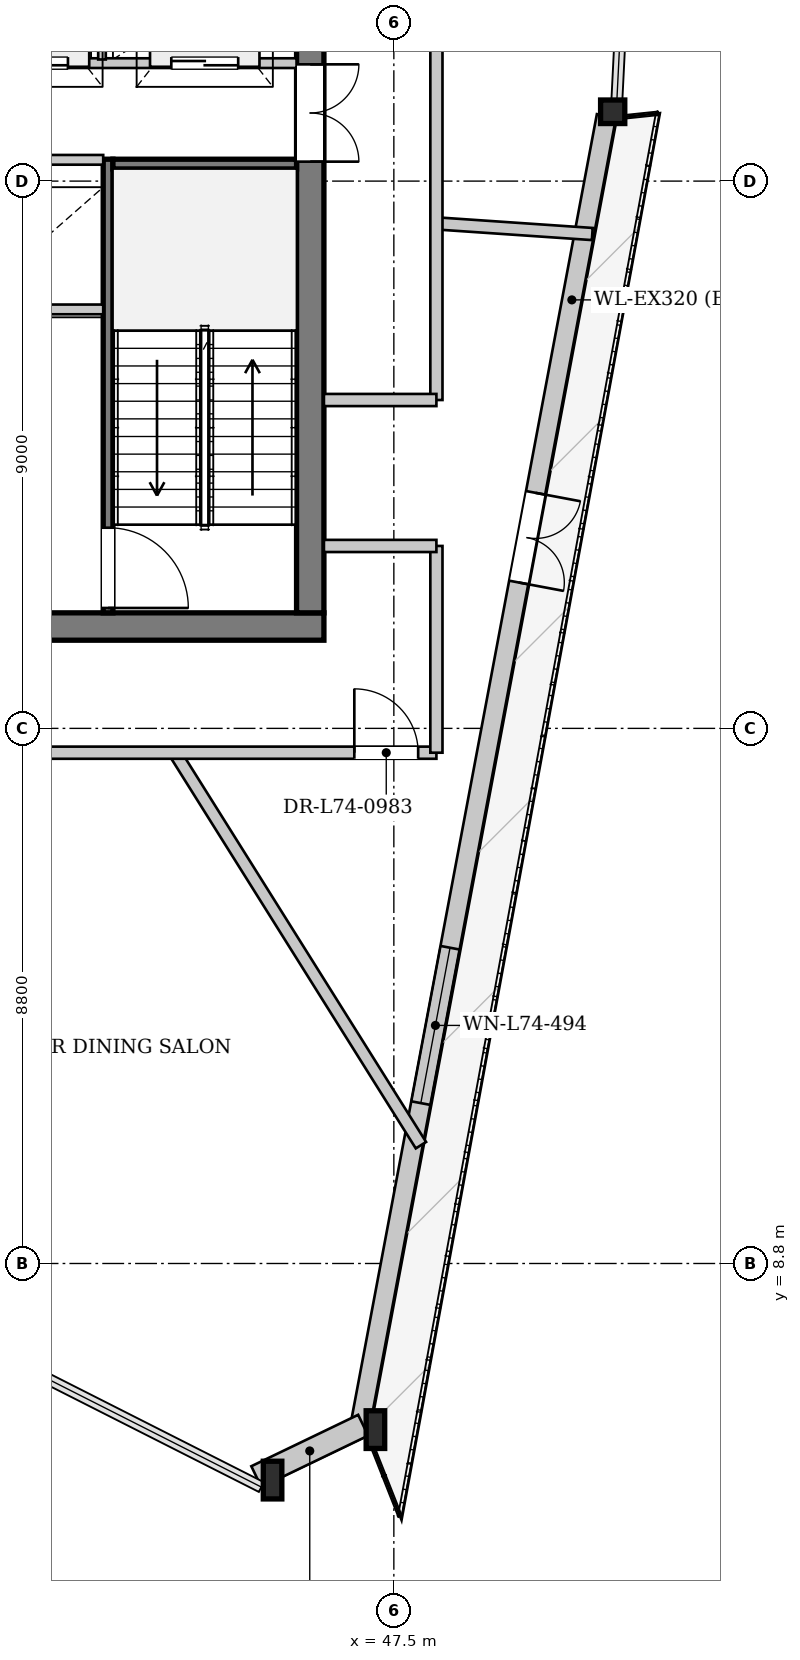
"""IFC4 building model, lengths in metres.
Left out: names, types, materials, properties, quantities, classifications, styles, units other than length and angle.
Written with IfcOpenShell. Run it as: python <this file> out.ifc"""

import sys

from ifc_helpers import new_model, si_unit, direction, frame, frame_2d, origin, origin_2d, place, context, subcontext, project, spatial, rectangle, i_section, extrude, source, transform, mapped, element, fill, save


model = new_model("IFC4")
c1 = context("Model", 3, precision=1e-05, world=origin(), true_north=direction((0.0, 1.0)))
c2 = subcontext(c1, "Body", "Model", "MODEL_VIEW")
j1 = project(units=[si_unit("LENGTHUNIT", "METRE"), si_unit("PLANEANGLEUNIT", "RADIAN")], contexts=[c1])
p1 = place(None, origin())
s1 = spatial("IfcSite", under=j1, at=p1, CompositionType="ELEMENT")
p2 = place(p1, origin())
s2 = spatial("IfcBuilding", under=s1, at=p2, CompositionType="ELEMENT")
p3 = place(p2, frame((0.0, 0.0, 277.7)))
s3 = spatial("IfcBuildingStorey", under=s2, at=p3, CompositionType="ELEMENT", Elevation=277.7)
m1 = source(origin(), c2, "Body", "SweptSolid", [
    extrude(i_section(OverallWidth=0.305, OverallDepth=0.62, WebThickness=0.021, FlangeThickness=0.04, at=origin_2d()), origin(), (0.0, 0.0, 1.0), 3.959),
])
p4 = place(p3, frame((45.321, 5.123, 0.0), z_axis=(0.093241063797, 0.057967328022, 0.993954673466), x_axis=(-0.527977918336, 0.84925809843, 0.0)))
e1 = element("IfcColumn", 1, at=p4, inside=s3, PredefinedType="COLUMN", context=c2, shape_type="MappedRepresentation", body=[
    mapped(m1, transform((0.0, 0.0, 0.0), x_axis=(1.0, 0.0, 0.0), y_axis=(0.0, 1.0, 0.0), z_axis=(0.0, 0.0, 1.0), scale=1.0)),
])
m2 = source(origin(), c2, "Body", "SweptSolid", [
    extrude(i_section(OverallWidth=0.305, OverallDepth=0.62, WebThickness=0.021, FlangeThickness=0.04, at=origin_2d()), origin(), (0.0, 0.0, 1.0), 3.947),
])
p5 = place(p3, frame((47.078, 5.969, 0.0), z_axis=(0.060366430178, 0.050222890681, 0.996912009838), x_axis=(-0.639564408319, 0.768737515418, 0.0)))
e2 = element("IfcColumn", 2, at=p5, inside=s3, PredefinedType="COLUMN", context=c2, shape_type="MappedRepresentation", body=[
    mapped(m2, transform((0.0, 0.0, 0.0), x_axis=(1.0, 0.0, 0.0), y_axis=(0.0, 1.0, 0.0), z_axis=(0.0, 0.0, 1.0), scale=1.0)),
])
m3 = source(origin(), c2, "Body", "SweptSolid", [
    extrude(i_section(OverallWidth=0.398, OverallDepth=0.387, WebThickness=0.019, FlangeThickness=0.029, at=origin_2d()), origin(), (0.0, 0.0, 1.0), 3.941),
])
p6 = place(p3, frame((51.154, 27.642, 0.0), z_axis=(-0.027750061815, 0.049615623914, 0.998382804305), x_axis=(-0.872766014986, -0.488138794899, 0.0)))
e3 = element("IfcColumn", 3, at=p6, inside=s3, PredefinedType="COLUMN", context=c2, shape_type="MappedRepresentation", body=[
    mapped(m3, transform((0.0, 0.0, 0.0), x_axis=(1.0, 0.0, 0.0), y_axis=(0.0, 1.0, 0.0), z_axis=(0.0, 0.0, 1.0), scale=1.0)),
])
p7 = place(p3, frame((50.997, 27.672, 0.0), z_axis=(0.0, 0.0, 1.0), x_axis=(-0.184819886047, -0.982772409931, 0.0)))
e4 = element("IfcWall", 4, at=p7, inside=s3, PredefinedType="SOLIDWALL", context=c2, shape_type="SweptSolid", body=[
    extrude(rectangle(XDim=22.053, YDim=0.32, at=frame_2d((11.027, 0.0))), origin(), (0.0, 0.0, 1.0), 3.462),
])
p8 = place(p7, frame((6.307, 0.0, 0.0)))
e5 = element("IfcOpeningElement", 5, at=p8, cuts=e4, PredefinedType="OPENING", context=c2, shape_type="SweptSolid", body=[
    extrude(rectangle(XDim=1.5, YDim=2.3, at=frame_2d((0.75, 1.15))), frame((0.0, 0.17, 0.0), z_axis=(0.0, -1.0, 0.0), x_axis=(1.0, 0.0, 0.0)), (0.0, 0.0, 1.0), 0.34),
])
p9 = place(p7, frame((13.919, 0.0, 0.65)))
e6 = element("IfcOpeningElement", 6, at=p9, cuts=e4, PredefinedType="OPENING", context=c2, shape_type="SweptSolid", body=[
    extrude(rectangle(XDim=2.6, YDim=2.35, at=frame_2d((1.3, 1.175))), frame((0.0, 0.17, 0.0), z_axis=(0.0, -1.0, 0.0), x_axis=(1.0, 0.0, 0.0)), (0.0, 0.0, 1.0), 0.34),
])
p10 = place(p3, frame((46.996, 6.14, 0.0), z_axis=(0.0, 0.0, 1.0), x_axis=(-0.901133930153, -0.43354081691, 0.0)))
e7 = element("IfcWall", 7, at=p10, inside=s3, PredefinedType="SOLIDWALL", context=c2, shape_type="SweptSolid", body=[
    extrude(rectangle(XDim=1.95, YDim=0.38, at=frame_2d((0.975, 0.0))), origin(), (0.0, 0.0, 1.0), 3.462),
])
p11 = place(p3, frame((46.35, 19.275, 0.0), z_axis=(0.0, 0.0, 1.0), x_axis=(-1.0, 0.0, 0.0)))
e8 = element("IfcWall", 8, at=p11, inside=s3, PredefinedType="SHEAR", context=c2, shape_type="SweptSolid", body=[
    extrude(rectangle(XDim=16.7, YDim=0.45, at=frame_2d((8.35, 0.0))), origin(), (0.0, 0.0, 1.0), 3.92),
])
p12 = place(p11, frame((4.55, 0.0, 0.0)))
e9 = element("IfcOpeningElement", 9, at=p12, cuts=e8, PredefinedType="OPENING", context=c2, shape_type="SweptSolid", body=[
    extrude(rectangle(XDim=1.12, YDim=2.25, at=frame_2d((0.56, 1.125))), frame((0.0, 0.235, 0.0), z_axis=(0.0, -1.0, 0.0), x_axis=(1.0, 0.0, 0.0)), (0.0, 0.0, 1.0), 0.47),
])
p13 = place(p11, frame((11.05, 0.0, 0.0)))
e10 = element("IfcOpeningElement", 10, at=p13, cuts=e8, PredefinedType="OPENING", context=c2, shape_type="SweptSolid", body=[
    extrude(rectangle(XDim=1.12, YDim=2.25, at=frame_2d((0.56, 1.125))), frame((0.0, 0.235, 0.0), z_axis=(0.0, -1.0, 0.0), x_axis=(1.0, 0.0, 0.0)), (0.0, 0.0, 1.0), 0.47),
])
p14 = place(p3, frame((46.125, 33.7, 0.0), z_axis=(0.0, 0.0, 1.0), x_axis=(0.0, -1.0, 0.0)))
e11 = element("IfcWall", 11, at=p14, inside=s3, PredefinedType="SHEAR", context=c2, shape_type="SweptSolid", body=[
    extrude(rectangle(XDim=14.2, YDim=0.45, at=frame_2d((7.1, 0.0))), origin(), (0.0, 0.0, 1.0), 3.92),
])
p15 = place(p14, frame((5.18, 0.0, 0.0)))
e12 = element("IfcOpeningElement", 12, at=p15, cuts=e11, PredefinedType="OPENING", context=c2, shape_type="SweptSolid", body=[
    extrude(rectangle(XDim=1.6, YDim=2.2, at=frame_2d((0.8, 1.1))), frame((0.0, 0.235, 0.0), z_axis=(0.0, -1.0, 0.0), x_axis=(1.0, 0.0, 0.0)), (0.0, 0.0, 1.0), 0.47),
])
p16 = place(p14, frame((2.05, 0.0, 0.0)))
e13 = element("IfcOpeningElement", 13, at=p16, cuts=e11, PredefinedType="OPENING", context=c2, shape_type="SweptSolid", body=[
    extrude(rectangle(XDim=0.95, YDim=2.1, at=frame_2d((0.475, 1.05))), frame((0.0, 0.235, 0.0), z_axis=(0.0, -1.0, 0.0), x_axis=(1.0, 0.0, 0.0)), (0.0, 0.0, 1.0), 0.47),
])
p17 = place(p3, frame((42.8, 26.96, 0.0), z_axis=(0.0, 0.0, 1.0), x_axis=(0.0, -1.0, 0.0)))
e14 = element("IfcWall", 14, at=p17, inside=s3, PredefinedType="PARTITIONING", context=c2, shape_type="SweptSolid", body=[
    extrude(rectangle(XDim=7.46, YDim=0.16, at=frame_2d((3.73, 0.0))), origin(), (0.0, 0.0, 1.0), 3.92),
])
p18 = place(p17, frame((6.06, 0.0, 0.0)))
e15 = element("IfcOpeningElement", 15, at=p18, cuts=e14, PredefinedType="OPENING", context=c2, shape_type="SweptSolid", body=[
    extrude(rectangle(XDim=1.32, YDim=2.2, at=frame_2d((0.66, 1.1))), frame((0.0, 0.09, 0.0), z_axis=(0.0, -1.0, 0.0), x_axis=(1.0, 0.0, 0.0)), (0.0, 0.0, 1.0), 0.18),
])
p19 = place(p3, frame((42.88, 26.88, 0.0), z_axis=(0.0, 0.0, 1.0), x_axis=(1.0, 0.0, 0.0)))
e16 = element("IfcWall", 16, at=p19, inside=s3, PredefinedType="PARTITIONING", context=c2, shape_type="SweptSolid", body=[
    extrude(rectangle(XDim=3.02, YDim=0.16, at=frame_2d((1.51, 0.0))), origin(), (0.0, 0.0, 1.0), 3.92),
])
p20 = place(p3, frame((33.28, 24.49, 0.0), z_axis=(0.0, 0.0, 1.0), x_axis=(1.0, 0.0, 0.0)))
e17 = element("IfcWall", 17, at=p20, inside=s3, PredefinedType="PARTITIONING", context=c2, shape_type="SweptSolid", body=[
    extrude(rectangle(XDim=9.44, YDim=0.16, at=frame_2d((4.72, 0.0))), origin(), (0.0, 0.0, 1.0), 3.92),
])
p21 = place(p20, frame((0.85, 0.0, 0.95)))
e18 = element("IfcOpeningElement", 18, at=p21, cuts=e17, PredefinedType="OPENING", context=c2, shape_type="SweptSolid", body=[
    extrude(rectangle(XDim=1.4, YDim=1.8, at=frame_2d((0.7, 0.9))), frame((0.0, 0.09, 0.0), z_axis=(0.0, -1.0, 0.0), x_axis=(1.0, 0.0, 0.0)), (0.0, 0.0, 1.0), 0.18),
])
p22 = place(p3, frame((33.28, 26.95, 0.0), z_axis=(0.0, 0.0, 1.0), x_axis=(1.0, 0.0, 0.0)))
e19 = element("IfcWall", 19, at=p22, inside=s3, PredefinedType="PARTITIONING", context=c2, shape_type="SweptSolid", body=[
    extrude(rectangle(XDim=9.44, YDim=0.16, at=frame_2d((4.72, 0.0))), origin(), (0.0, 0.0, 1.0), 3.92),
])
p23 = place(p22, frame((1.2, 0.0, 0.0)))
e20 = element("IfcOpeningElement", 20, at=p23, cuts=e19, PredefinedType="OPENING", context=c2, shape_type="SweptSolid", body=[
    extrude(rectangle(XDim=0.95, YDim=2.1, at=frame_2d((0.475, 1.05))), frame((0.0, 0.09, 0.0), z_axis=(0.0, -1.0, 0.0), x_axis=(1.0, 0.0, 0.0)), (0.0, 0.0, 1.0), 0.18),
])
p24 = place(p22, frame((4.65, 0.0, 0.0)))
e21 = element("IfcOpeningElement", 21, at=p24, cuts=e19, PredefinedType="OPENING", context=c2, shape_type="SweptSolid", body=[
    extrude(rectangle(XDim=0.95, YDim=2.1, at=frame_2d((0.475, 1.05))), frame((0.0, 0.09, 0.0), z_axis=(0.0, -1.0, 0.0), x_axis=(1.0, 0.0, 0.0)), (0.0, 0.0, 1.0), 0.18),
])
p25 = place(p3, frame((33.28, 28.54, 0.0), z_axis=(0.0, 0.0, 1.0), x_axis=(1.0, 0.0, 0.0)))
e22 = element("IfcWall", 22, at=p25, inside=s3, PredefinedType="PARTITIONING", context=c2, shape_type="SweptSolid", body=[
    extrude(rectangle(XDim=12.62, YDim=0.16, at=frame_2d((6.31, 0.0))), origin(), (0.0, 0.0, 1.0), 3.92),
])
p26 = place(p25, frame((5.63, 0.0, 0.0)))
e23 = element("IfcOpeningElement", 23, at=p26, cuts=e22, PredefinedType="OPENING", context=c2, shape_type="SweptSolid", body=[
    extrude(rectangle(XDim=1.1, YDim=2.2, at=frame_2d((0.55, 1.1))), frame((0.0, 0.09, 0.0), z_axis=(0.0, -1.0, 0.0), x_axis=(1.0, 0.0, 0.0)), (0.0, 0.0, 1.0), 0.18),
])
p27 = place(p25, frame((7.76, 0.0, 0.0)))
e24 = element("IfcOpeningElement", 24, at=p27, cuts=e22, PredefinedType="OPENING", context=c2, shape_type="SweptSolid", body=[
    extrude(rectangle(XDim=1.1, YDim=2.2, at=frame_2d((0.55, 1.1))), frame((0.0, 0.09, 0.0), z_axis=(0.0, -1.0, 0.0), x_axis=(1.0, 0.0, 0.0)), (0.0, 0.0, 1.0), 0.18),
])
p28 = place(p25, frame((10.56, 0.0, 0.0)))
e25 = element("IfcOpeningElement", 25, at=p28, cuts=e22, PredefinedType="OPENING", context=c2, shape_type="SweptSolid", body=[
    extrude(rectangle(XDim=1.1, YDim=2.2, at=frame_2d((0.55, 1.1))), frame((0.0, 0.09, 0.0), z_axis=(0.0, -1.0, 0.0), x_axis=(1.0, 0.0, 0.0)), (0.0, 0.0, 1.0), 0.18),
])
p29 = place(p3, frame((42.7, 28.6, 0.0), z_axis=(0.0, 0.0, 1.0), x_axis=(0.0, 1.0, 0.0)))
e26 = element("IfcWall", 26, at=p29, inside=s3, PredefinedType="PARTITIONING", context=c2, shape_type="SweptSolid", body=[
    extrude(rectangle(XDim=1.92, YDim=0.125, at=frame_2d((0.96, 0.0))), origin(), (0.0, 0.0, 1.0), 3.92),
])
p30 = place(p3, frame((43.896, 17.2, 0.0), z_axis=(0.0, 0.0, 1.0), x_axis=(0.531409475287, -0.847115086382, 0.0)))
e27 = element("IfcWall", 27, at=p30, inside=s3, PredefinedType="PARTITIONING", context=c2, shape_type="SweptSolid", body=[
    extrude(rectangle(XDim=7.619, YDim=0.2, at=frame_2d((3.81, 0.0))), origin(), (0.0, 0.0, 1.0), 3.92),
])
p31 = place(p3, frame((48.2, 25.905, 0.0), z_axis=(0.0, 0.0, 1.0), x_axis=(0.997689551273, -0.067937907539, 0.0)))
e28 = element("IfcWall", 28, at=p31, inside=s3, PredefinedType="PARTITIONING", context=c2, shape_type="SweptSolid", body=[
    extrude(rectangle(XDim=2.569, YDim=0.2, at=frame_2d((1.285, 0.0))), origin(), (0.0, 0.0, 1.0), 3.92),
])
p32 = place(p3, frame((27.8, 17.2, 0.0), z_axis=(0.0, 0.0, 1.0), x_axis=(1.0, 0.0, 0.0)))
e29 = element("IfcWall", 29, at=p32, inside=s3, PredefinedType="PARTITIONING", context=c2, shape_type="SweptSolid", body=[
    extrude(rectangle(XDim=20.4, YDim=0.2, at=frame_2d((10.2, 0.0))), origin(), (0.0, 0.0, 1.0), 3.92),
])
p33 = place(p32, frame((0.3, 0.0, 0.0)))
e30 = element("IfcOpeningElement", 30, at=p33, cuts=e29, PredefinedType="OPENING", context=c2, shape_type="SweptSolid", body=[
    extrude(rectangle(XDim=1.05, YDim=2.2, at=frame_2d((0.525, 1.1))), frame((0.0, 0.11, 0.0), z_axis=(0.0, -1.0, 0.0), x_axis=(1.0, 0.0, 0.0)), (0.0, 0.0, 1.0), 0.22),
])
p34 = place(p32, frame((11.805, 0.0, 0.0)))
e31 = element("IfcOpeningElement", 31, at=p34, cuts=e29, PredefinedType="OPENING", context=c2, shape_type="SweptSolid", body=[
    extrude(rectangle(XDim=1.05, YDim=2.2, at=frame_2d((0.525, 1.1))), frame((0.0, 0.11, 0.0), z_axis=(0.0, -1.0, 0.0), x_axis=(1.0, 0.0, 0.0)), (0.0, 0.0, 1.0), 0.22),
])
p35 = place(p32, frame((19.05, 0.0, 0.0)))
e32 = element("IfcOpeningElement", 32, at=p35, cuts=e29, PredefinedType="OPENING", context=c2, shape_type="SweptSolid", body=[
    extrude(rectangle(XDim=1.05, YDim=2.2, at=frame_2d((0.525, 1.1))), frame((0.0, 0.11, 0.0), z_axis=(0.0, -1.0, 0.0), x_axis=(1.0, 0.0, 0.0)), (0.0, 0.0, 1.0), 0.22),
])
p36 = place(p3, frame((48.2, 17.2, 0.0), z_axis=(0.0, 0.0, 1.0), x_axis=(0.0, 1.0, 0.0)))
e33 = element("IfcWall", 33, at=p36, inside=s3, PredefinedType="PARTITIONING", context=c2, shape_type="SweptSolid", body=[
    extrude(rectangle(XDim=3.4, YDim=0.2, at=frame_2d((1.7, 0.0))), origin(), (0.0, 0.0, 1.0), 3.92),
])
p37 = place(p3, frame((46.35, 20.6, 0.0), z_axis=(0.0, 0.0, 1.0), x_axis=(1.0, 0.0, 0.0)))
e34 = element("IfcWall", 34, at=p37, inside=s3, PredefinedType="PARTITIONING", context=c2, shape_type="SweptSolid", body=[
    extrude(rectangle(XDim=1.85, YDim=0.2, at=frame_2d((0.925, 0.0))), origin(), (0.0, 0.0, 1.0), 3.92),
])
p38 = place(p3, frame((48.2, 23.0, 0.0), z_axis=(0.0, 0.0, 1.0), x_axis=(0.0, 1.0, 0.0)))
e35 = element("IfcWall", 35, at=p38, inside=s3, PredefinedType="PARTITIONING", context=c2, shape_type="SweptSolid", body=[
    extrude(rectangle(XDim=13.0, YDim=0.2, at=frame_2d((6.5, 0.0))), origin(), (0.0, 0.0, 1.0), 3.605),
])
p39 = place(p38, frame((6.366, 0.0, 0.0)))
e36 = element("IfcOpeningElement", 36, at=p39, cuts=e35, PredefinedType="OPENING", context=c2, shape_type="SweptSolid", body=[
    extrude(rectangle(XDim=1.05, YDim=2.2, at=frame_2d((0.525, 1.1))), frame((0.0, 0.11, 0.0), z_axis=(0.0, -1.0, 0.0), x_axis=(1.0, 0.0, 0.0)), (0.0, 0.0, 1.0), 0.22),
])
p40 = place(p38, frame((11.65, 0.0, 0.0)))
e37 = element("IfcOpeningElement", 37, at=p40, cuts=e35, PredefinedType="OPENING", context=c2, shape_type="SweptSolid", body=[
    extrude(rectangle(XDim=1.05, YDim=2.2, at=frame_2d((0.525, 1.1))), frame((0.0, 0.11, 0.0), z_axis=(0.0, -1.0, 0.0), x_axis=(1.0, 0.0, 0.0)), (0.0, 0.0, 1.0), 0.22),
])
p41 = place(p3, frame((46.35, 23.0, 0.0), z_axis=(0.0, 0.0, 1.0), x_axis=(1.0, 0.0, 0.0)))
e38 = element("IfcWall", 38, at=p41, inside=s3, PredefinedType="PARTITIONING", context=c2, shape_type="SweptSolid", body=[
    extrude(rectangle(XDim=1.85, YDim=0.2, at=frame_2d((0.925, 0.0))), origin(), (0.0, 0.0, 1.0), 3.92),
])
m4 = source(origin(), c2, "Body", "SweptSolid", [
    extrude(rectangle(XDim=1.5, YDim=2.3, at=frame_2d((0.75, 1.15))), frame((0.0, 0.025, 0.0), z_axis=(0.0, -1.0, 0.0), x_axis=(1.0, 0.0, 0.0)), (0.0, 0.0, 1.0), 0.05),
])
p42 = place(p8, origin())
e39 = element("IfcDoor", 39, at=p42, inside=s3, OperationType="DOUBLE_DOOR_SINGLE_SWING", PredefinedType="DOOR", context=c2, shape_type="MappedRepresentation", body=[
    mapped(m4, transform((0.0, 0.0, 0.0), x_axis=(1.0, 0.0, 0.0), y_axis=(0.0, 1.0, 0.0), z_axis=(0.0, 0.0, 1.0), scale=1.0)),
])
fill(e5, e39)
m5 = source(origin(), c2, "Body", "SweptSolid", [
    extrude(rectangle(XDim=2.6, YDim=2.35, at=frame_2d((1.3, 1.175))), frame((0.0, 0.03, 0.0), z_axis=(0.0, -1.0, 0.0), x_axis=(1.0, 0.0, 0.0)), (0.0, 0.0, 1.0), 0.06),
])
p43 = place(p9, origin())
e40 = element("IfcWindow", 40, at=p43, inside=s3, PartitioningType="SINGLE_PANEL", PredefinedType="WINDOW", context=c2, shape_type="MappedRepresentation", body=[
    mapped(m5, transform((0.0, 0.0, 0.0), x_axis=(1.0, 0.0, 0.0), y_axis=(0.0, 1.0, 0.0), z_axis=(0.0, 0.0, 1.0), scale=1.0)),
])
fill(e6, e40)
m6 = source(origin(), c2, "Body", "SweptSolid", [
    extrude(rectangle(XDim=1.6, YDim=2.2, at=frame_2d((0.8, 1.1))), frame((0.0, 0.025, 0.0), z_axis=(0.0, -1.0, 0.0), x_axis=(1.0, 0.0, 0.0)), (0.0, 0.0, 1.0), 0.05),
])
p44 = place(p15, origin())
e41 = element("IfcDoor", 41, at=p44, inside=s3, OperationType="DOUBLE_DOOR_SINGLE_SWING", PredefinedType="DOOR", context=c2, shape_type="MappedRepresentation", body=[
    mapped(m6, transform((0.0, 0.0, 0.0), x_axis=(1.0, 0.0, 0.0), y_axis=(0.0, 1.0, 0.0), z_axis=(0.0, 0.0, 1.0), scale=1.0)),
])
fill(e12, e41)
m7 = source(origin(), c2, "Body", "SweptSolid", [
    extrude(rectangle(XDim=1.32, YDim=2.2, at=frame_2d((0.66, 1.1))), frame((0.0, 0.025, 0.0), z_axis=(0.0, -1.0, 0.0), x_axis=(1.0, 0.0, 0.0)), (0.0, 0.0, 1.0), 0.05),
])
p45 = place(p18, origin())
e42 = element("IfcDoor", 42, at=p45, inside=s3, OperationType="SINGLE_SWING_RIGHT", PredefinedType="DOOR", context=c2, shape_type="MappedRepresentation", body=[
    mapped(m7, transform((0.0, 0.0, 0.0), x_axis=(1.0, 0.0, 0.0), y_axis=(0.0, 1.0, 0.0), z_axis=(0.0, 0.0, 1.0), scale=1.0)),
])
fill(e15, e42)
m8 = source(origin(), c2, "Body", "SweptSolid", [
    extrude(rectangle(XDim=1.1, YDim=2.2, at=frame_2d((0.55, 1.1))), frame((0.0, 0.025, 0.0), z_axis=(0.0, -1.0, 0.0), x_axis=(1.0, 0.0, 0.0)), (0.0, 0.0, 1.0), 0.05),
])
p46 = place(p27, origin())
e43 = element("IfcDoor", 43, at=p46, inside=s3, OperationType="DOUBLE_DOOR_SLIDING", PredefinedType="DOOR", context=c2, shape_type="MappedRepresentation", body=[
    mapped(m8, transform((0.0, 0.0, 0.0), x_axis=(1.0, 0.0, 0.0), y_axis=(0.0, 1.0, 0.0), z_axis=(0.0, 0.0, 1.0), scale=1.0)),
])
fill(e24, e43)
p47 = place(p28, origin())
e44 = element("IfcDoor", 44, at=p47, inside=s3, OperationType="DOUBLE_DOOR_SLIDING", PredefinedType="DOOR", context=c2, shape_type="MappedRepresentation", body=[
    mapped(m8, transform((0.0, 0.0, 0.0), x_axis=(1.0, 0.0, 0.0), y_axis=(0.0, 1.0, 0.0), z_axis=(0.0, 0.0, 1.0), scale=1.0)),
])
fill(e25, e44)
m9 = source(origin(), c2, "Body", "SweptSolid", [
    extrude(rectangle(XDim=1.05, YDim=2.2, at=frame_2d((0.525, 1.1))), frame((0.0, 0.025, 0.0), z_axis=(0.0, -1.0, 0.0), x_axis=(1.0, 0.0, 0.0)), (0.0, 0.0, 1.0), 0.05),
])
p48 = place(p35, origin())
e45 = element("IfcDoor", 45, at=p48, inside=s3, OperationType="SINGLE_SWING_LEFT", PredefinedType="DOOR", context=c2, shape_type="MappedRepresentation", body=[
    mapped(m9, transform((0.0, 0.0, 0.0), x_axis=(1.0, 0.0, 0.0), y_axis=(0.0, 1.0, 0.0), z_axis=(0.0, 0.0, 1.0), scale=1.0)),
])
fill(e32, e45)
save(model, sys.argv[1])
